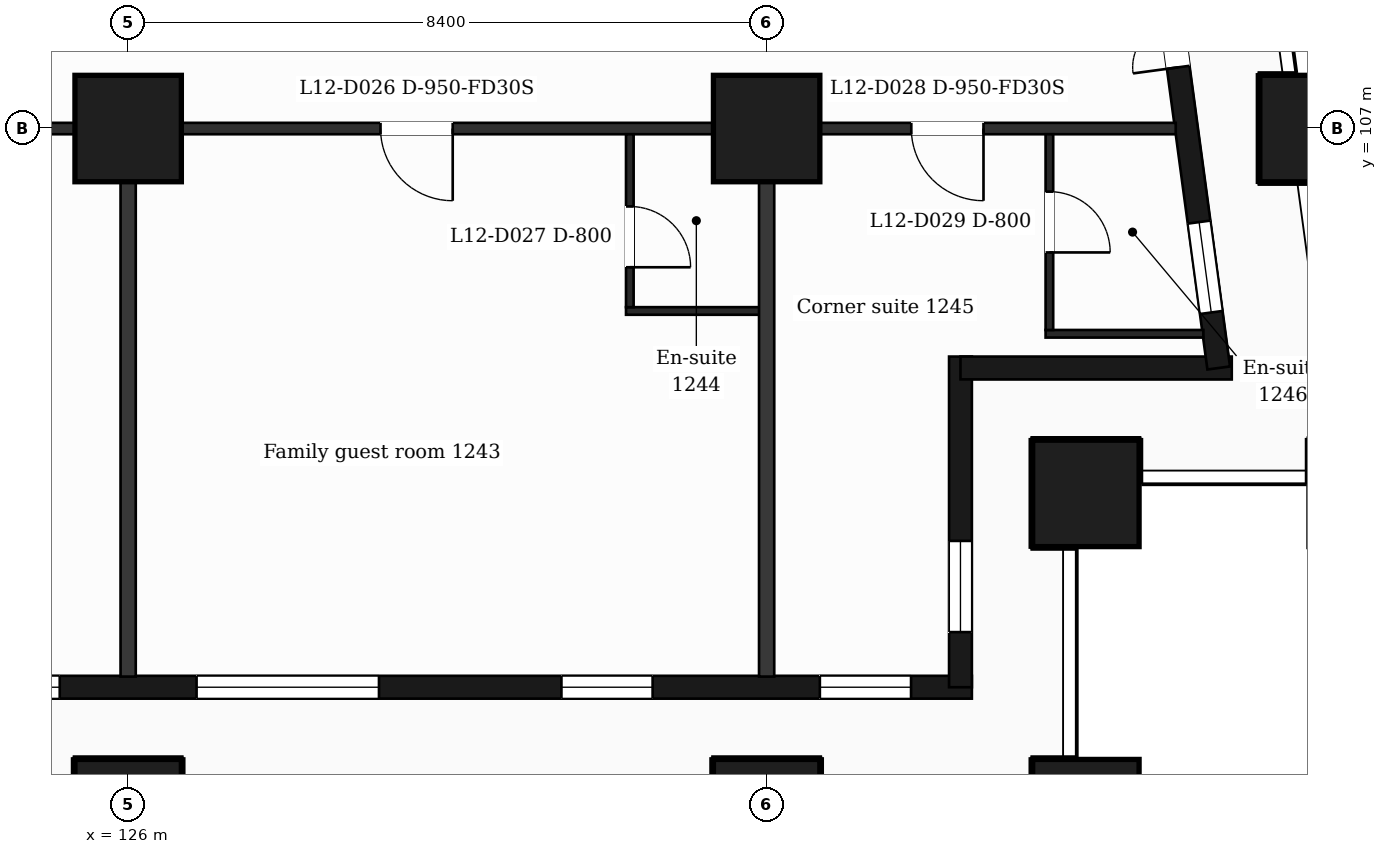
"""IFC4 building model, lengths in metres.
Left out: names, types, materials, properties, quantities, classifications, styles, units other than length and angle.
Written with IfcOpenShell. Run it as: python <this file> out.ifc"""

import sys

from ifc_helpers import new_model, si_unit, direction, frame, frame_2d, origin, origin_2d, place, context, subcontext, project, spatial, rectangle, extrude, element, fill, save


model = new_model("IFC4")
c1 = context("Model", 3, precision=1e-05, world=origin(), true_north=direction((0.0, 1.0)))
c2 = subcontext(c1, "Body", "Model", "MODEL_VIEW")
j1 = project(units=[si_unit("LENGTHUNIT", "METRE"), si_unit("PLANEANGLEUNIT", "RADIAN")], contexts=[c1])
p1 = place(None, origin())
s1 = spatial("IfcSite", under=j1, at=p1, CompositionType="ELEMENT")
p2 = place(p1, origin())
s2 = spatial("IfcBuilding", under=s1, at=p2, CompositionType="ELEMENT")
p3 = place(p2, frame((0.0, 0.0, 60.0)))
s3 = spatial("IfcBuildingStorey", under=s2, at=p3, CompositionType="ELEMENT", Elevation=60.0)
for number, where, z_axis, x_axis in (
    (1, (126.0, 98.0, 0.0), (0.0, 0.0, 1.0), (1.0, 0.0, 0.0)),
    (2, (134.4, 98.0, 0.0), (0.0, 0.0, 1.0), (1.0, 0.0, 0.0)),
    (3, (138.6, 98.0, 0.0), (0.0, 0.0, 1.0), (1.0, 0.0, 0.0)),
    (4, (138.6, 102.2, 0.0), (0.0, 0.0, 1.0), (1.0, 0.0, 0.0)),
    (5, (126.0, 107.0, 0.0), (0.0, 0.0, 1.0), (1.0, 0.0, 0.0)),
    (6, (134.4, 107.0, 0.0), (0.0, 0.0, 1.0), (1.0, 0.0, 0.0)),
    (7, (141.588, 107.0, 0.0), (0.0, 0.0, 1.0), (1.0, 0.0, 0.0)),
):
    element("IfcColumn", number, at=place(p3, frame(where, z_axis=z_axis, x_axis=x_axis)), inside=s3, PredefinedType="COLUMN", context=c2, shape_type="SweptSolid", body=[
        extrude(rectangle(XDim=1.4, YDim=1.4, at=origin_2d()), origin(), (0.0, 0.0, 1.0), 3.5),
    ])
p4 = place(p3, frame((89.85, 99.65, 0.0), z_axis=(0.0, 0.0, 1.0), x_axis=(1.0, 0.0, 0.0)))
e8 = element("IfcWall", 8, at=p4, inside=s3, PredefinedType="SOLIDWALL", context=c2, shape_type="SweptSolid", body=[
    extrude(rectangle(XDim=47.25, YDim=0.3, at=frame_2d((23.625, 0.0))), origin(), (0.0, 0.0, 1.0), 3.18),
])
p5 = place(p4, frame((0.725, 0.0, 0.9)))
e9 = element("IfcOpeningElement", 9, at=p5, cuts=e8, PredefinedType="OPENING", context=c2, shape_type="SweptSolid", body=[
    extrude(rectangle(XDim=1.2, YDim=2.1, at=frame_2d((0.6, 1.05))), frame((0.0, 0.16, 0.0), z_axis=(0.0, -1.0, 0.0), x_axis=(1.0, 0.0, 0.0)), (0.0, 0.0, 1.0), 0.32),
])
p6 = place(p4, frame((3.45, 0.0, 0.9)))
e10 = element("IfcOpeningElement", 10, at=p6, cuts=e8, PredefinedType="OPENING", context=c2, shape_type="SweptSolid", body=[
    extrude(rectangle(XDim=2.4, YDim=2.1, at=frame_2d((1.2, 1.05))), frame((0.0, 0.16, 0.0), z_axis=(0.0, -1.0, 0.0), x_axis=(1.0, 0.0, 0.0)), (0.0, 0.0, 1.0), 0.32),
])
p7 = place(p4, frame((7.65, 0.0, 0.9)))
e11 = element("IfcOpeningElement", 11, at=p7, cuts=e8, PredefinedType="OPENING", context=c2, shape_type="SweptSolid", body=[
    extrude(rectangle(XDim=2.4, YDim=2.1, at=frame_2d((1.2, 1.05))), frame((0.0, 0.16, 0.0), z_axis=(0.0, -1.0, 0.0), x_axis=(1.0, 0.0, 0.0)), (0.0, 0.0, 1.0), 0.32),
])
p8 = place(p4, frame((12.45, 0.0, 0.9)))
e12 = element("IfcOpeningElement", 12, at=p8, cuts=e8, PredefinedType="OPENING", context=c2, shape_type="SweptSolid", body=[
    extrude(rectangle(XDim=1.2, YDim=2.1, at=frame_2d((0.6, 1.05))), frame((0.0, 0.16, 0.0), z_axis=(0.0, -1.0, 0.0), x_axis=(1.0, 0.0, 0.0)), (0.0, 0.0, 1.0), 0.32),
])
p9 = place(p4, frame((16.65, 0.0, 0.9)))
e13 = element("IfcOpeningElement", 13, at=p9, cuts=e8, PredefinedType="OPENING", context=c2, shape_type="SweptSolid", body=[
    extrude(rectangle(XDim=1.2, YDim=2.1, at=frame_2d((0.6, 1.05))), frame((0.0, 0.16, 0.0), z_axis=(0.0, -1.0, 0.0), x_axis=(1.0, 0.0, 0.0)), (0.0, 0.0, 1.0), 0.32),
])
p10 = place(p4, frame((19.95, 0.0, 0.9)))
e14 = element("IfcOpeningElement", 14, at=p10, cuts=e8, PredefinedType="OPENING", context=c2, shape_type="SweptSolid", body=[
    extrude(rectangle(XDim=1.2, YDim=2.1, at=frame_2d((0.6, 1.05))), frame((0.0, 0.16, 0.0), z_axis=(0.0, -1.0, 0.0), x_axis=(1.0, 0.0, 0.0)), (0.0, 0.0, 1.0), 0.32),
])
p11 = place(p4, frame((21.75, 0.0, 0.9)))
e15 = element("IfcOpeningElement", 15, at=p11, cuts=e8, PredefinedType="OPENING", context=c2, shape_type="SweptSolid", body=[
    extrude(rectangle(XDim=1.2, YDim=2.1, at=frame_2d((0.6, 1.05))), frame((0.0, 0.16, 0.0), z_axis=(0.0, -1.0, 0.0), x_axis=(1.0, 0.0, 0.0)), (0.0, 0.0, 1.0), 0.32),
])
p12 = place(p4, frame((25.05, 0.0, 0.0)))
e16 = element("IfcOpeningElement", 16, at=p12, cuts=e8, PredefinedType="OPENING", context=c2, shape_type="SweptSolid", body=[
    extrude(rectangle(XDim=1.2, YDim=2.4, at=frame_2d((0.6, 1.2))), frame((0.0, 0.16, 0.0), z_axis=(0.0, -1.0, 0.0), x_axis=(1.0, 0.0, 0.0)), (0.0, 0.0, 1.0), 0.32),
])
p13 = place(p4, frame((28.35, 0.0, 0.9)))
e17 = element("IfcOpeningElement", 17, at=p13, cuts=e8, PredefinedType="OPENING", context=c2, shape_type="SweptSolid", body=[
    extrude(rectangle(XDim=1.2, YDim=2.1, at=frame_2d((0.6, 1.05))), frame((0.0, 0.16, 0.0), z_axis=(0.0, -1.0, 0.0), x_axis=(1.0, 0.0, 0.0)), (0.0, 0.0, 1.0), 0.32),
])
p14 = place(p4, frame((30.15, 0.0, 0.9)))
e18 = element("IfcOpeningElement", 18, at=p14, cuts=e8, PredefinedType="OPENING", context=c2, shape_type="SweptSolid", body=[
    extrude(rectangle(XDim=1.2, YDim=2.1, at=frame_2d((0.6, 1.05))), frame((0.0, 0.16, 0.0), z_axis=(0.0, -1.0, 0.0), x_axis=(1.0, 0.0, 0.0)), (0.0, 0.0, 1.0), 0.32),
])
p15 = place(p4, frame((32.85, 0.0, 0.9)))
e19 = element("IfcOpeningElement", 19, at=p15, cuts=e8, PredefinedType="OPENING", context=c2, shape_type="SweptSolid", body=[
    extrude(rectangle(XDim=2.4, YDim=2.1, at=frame_2d((1.2, 1.05))), frame((0.0, 0.16, 0.0), z_axis=(0.0, -1.0, 0.0), x_axis=(1.0, 0.0, 0.0)), (0.0, 0.0, 1.0), 0.32),
])
p16 = place(p4, frame((37.05, 0.0, 0.9)))
e20 = element("IfcOpeningElement", 20, at=p16, cuts=e8, PredefinedType="OPENING", context=c2, shape_type="SweptSolid", body=[
    extrude(rectangle(XDim=2.4, YDim=2.1, at=frame_2d((1.2, 1.05))), frame((0.0, 0.16, 0.0), z_axis=(0.0, -1.0, 0.0), x_axis=(1.0, 0.0, 0.0)), (0.0, 0.0, 1.0), 0.32),
])
p17 = place(p4, frame((41.85, 0.0, 0.9)))
e21 = element("IfcOpeningElement", 21, at=p17, cuts=e8, PredefinedType="OPENING", context=c2, shape_type="SweptSolid", body=[
    extrude(rectangle(XDim=1.2, YDim=2.1, at=frame_2d((0.6, 1.05))), frame((0.0, 0.16, 0.0), z_axis=(0.0, -1.0, 0.0), x_axis=(1.0, 0.0, 0.0)), (0.0, 0.0, 1.0), 0.32),
])
p18 = place(p4, frame((45.25, 0.0, 0.9)))
e22 = element("IfcOpeningElement", 22, at=p18, cuts=e8, PredefinedType="OPENING", context=c2, shape_type="SweptSolid", body=[
    extrude(rectangle(XDim=1.2, YDim=2.1, at=frame_2d((0.6, 1.05))), frame((0.0, 0.16, 0.0), z_axis=(0.0, -1.0, 0.0), x_axis=(1.0, 0.0, 0.0)), (0.0, 0.0, 1.0), 0.32),
])
p19 = place(p3, frame((136.95, 99.65, 0.0), z_axis=(0.0, 0.0, 1.0), x_axis=(0.0, 1.0, 0.0)))
e23 = element("IfcWall", 23, at=p19, inside=s3, PredefinedType="SOLIDWALL", context=c2, shape_type="SweptSolid", body=[
    extrude(rectangle(XDim=4.35, YDim=0.3, at=frame_2d((2.175, 0.0))), origin(), (0.0, 0.0, 1.0), 3.18),
])
p20 = place(p19, frame((0.725, 0.0, 0.9)))
e24 = element("IfcOpeningElement", 24, at=p20, cuts=e23, PredefinedType="OPENING", context=c2, shape_type="SweptSolid", body=[
    extrude(rectangle(XDim=1.2, YDim=2.1, at=frame_2d((0.6, 1.05))), frame((0.0, 0.16, 0.0), z_axis=(0.0, -1.0, 0.0), x_axis=(1.0, 0.0, 0.0)), (0.0, 0.0, 1.0), 0.32),
])
p21 = place(p3, frame((136.95, 103.85, 0.0), z_axis=(0.0, 0.0, 1.0), x_axis=(1.0, 0.0, 0.0)))
e25 = element("IfcWall", 25, at=p21, inside=s3, PredefinedType="SOLIDWALL", context=c2, shape_type="SweptSolid", body=[
    extrude(rectangle(XDim=3.569, YDim=0.3, at=frame_2d((1.785, 0.0))), origin(), (0.0, 0.0, 1.0), 3.18),
])
p22 = place(p3, frame((140.348, 103.85, 0.0), z_axis=(0.0, 0.0, 1.0), x_axis=(-0.133431549479, 0.991058031401, 0.0)))
e26 = element("IfcWall", 26, at=p22, inside=s3, PredefinedType="SOLIDWALL", context=c2, shape_type="SweptSolid", body=[
    extrude(rectangle(XDim=6.609, YDim=0.3, at=frame_2d((3.304, 0.0))), origin(), (0.0, 0.0, 1.0), 3.18),
])
p23 = place(p22, frame((0.737, 0.0, 0.9)))
e27 = element("IfcOpeningElement", 27, at=p23, cuts=e26, PredefinedType="OPENING", context=c2, shape_type="SweptSolid", body=[
    extrude(rectangle(XDim=1.2, YDim=2.1, at=frame_2d((0.6, 1.05))), frame((0.0, 0.16, 0.0), z_axis=(0.0, -1.0, 0.0), x_axis=(1.0, 0.0, 0.0)), (0.0, 0.0, 1.0), 0.32),
])
p24 = place(p22, frame((3.991, 0.0, 0.0)))
e28 = element("IfcOpeningElement", 28, at=p24, cuts=e26, PredefinedType="OPENING", context=c2, shape_type="SweptSolid", body=[
    extrude(rectangle(XDim=1.2, YDim=2.4, at=frame_2d((0.6, 1.2))), frame((0.0, 0.16, 0.0), z_axis=(0.0, -1.0, 0.0), x_axis=(1.0, 0.0, 0.0)), (0.0, 0.0, 1.0), 0.32),
])
p25 = place(p3, frame((138.07, 104.3, 0.0), z_axis=(0.0, 0.0, 1.0), x_axis=(1.0, 0.0, 0.0)))
e29 = element("IfcWall", 29, at=p25, inside=s3, PredefinedType="PARTITIONING", context=c2, shape_type="SweptSolid", body=[
    extrude(rectangle(XDim=2.076, YDim=0.1, at=frame_2d((1.038, 0.0))), origin(), (0.0, 0.0, 1.0), 3.18),
])
p26 = place(p3, frame((132.55, 104.6, 0.0), z_axis=(0.0, 0.0, 1.0), x_axis=(1.0, 0.0, 0.0)))
e30 = element("IfcWall", 30, at=p26, inside=s3, PredefinedType="PARTITIONING", context=c2, shape_type="SweptSolid", body=[
    extrude(rectangle(XDim=1.85, YDim=0.1, at=frame_2d((0.925, 0.0))), origin(), (0.0, 0.0, 1.0), 3.18),
])
p27 = place(p3, frame((87.018, 107.0, 0.0), z_axis=(0.0, 0.0, 1.0), x_axis=(1.0, 0.0, 0.0)))
e31 = element("IfcWall", 31, at=p27, inside=s3, PredefinedType="PARTITIONING", context=c2, shape_type="SweptSolid", body=[
    extrude(rectangle(XDim=52.765, YDim=0.15, at=frame_2d((26.382, 0.0))), origin(), (0.0, 0.0, 1.0), 3.18),
])
p28 = place(p27, frame((1.032, 0.0, 0.0)))
e32 = element("IfcOpeningElement", 32, at=p28, cuts=e31, PredefinedType="OPENING", context=c2, shape_type="SweptSolid", body=[
    extrude(rectangle(XDim=0.95, YDim=2.1, at=frame_2d((0.475, 1.05))), frame((0.0, 0.085, 0.0), z_axis=(0.0, -1.0, 0.0), x_axis=(1.0, 0.0, 0.0)), (0.0, 0.0, 1.0), 0.17),
])
p29 = place(p27, frame((6.894, 0.0, 0.0)))
e33 = element("IfcOpeningElement", 33, at=p29, cuts=e31, PredefinedType="OPENING", context=c2, shape_type="SweptSolid", body=[
    extrude(rectangle(XDim=0.95, YDim=2.1, at=frame_2d((0.475, 1.05))), frame((0.0, 0.085, 0.0), z_axis=(0.0, -1.0, 0.0), x_axis=(1.0, 0.0, 0.0)), (0.0, 0.0, 1.0), 0.17),
])
p30 = place(p27, frame((17.844, 0.0, 0.0)))
e34 = element("IfcOpeningElement", 34, at=p30, cuts=e31, PredefinedType="OPENING", context=c2, shape_type="SweptSolid", body=[
    extrude(rectangle(XDim=0.95, YDim=2.1, at=frame_2d((0.475, 1.05))), frame((0.0, 0.085, 0.0), z_axis=(0.0, -1.0, 0.0), x_axis=(1.0, 0.0, 0.0)), (0.0, 0.0, 1.0), 0.17),
])
p31 = place(p27, frame((26.245, 0.0, 0.0)))
e35 = element("IfcOpeningElement", 35, at=p31, cuts=e31, PredefinedType="OPENING", context=c2, shape_type="SweptSolid", body=[
    extrude(rectangle(XDim=0.95, YDim=2.1, at=frame_2d((0.475, 1.05))), frame((0.0, 0.085, 0.0), z_axis=(0.0, -1.0, 0.0), x_axis=(1.0, 0.0, 0.0)), (0.0, 0.0, 1.0), 0.17),
])
p32 = place(p27, frame((35.822, 0.0, 0.0)))
e36 = element("IfcOpeningElement", 36, at=p32, cuts=e31, PredefinedType="OPENING", context=c2, shape_type="SweptSolid", body=[
    extrude(rectangle(XDim=0.95, YDim=2.1, at=frame_2d((0.475, 1.05))), frame((0.0, 0.085, 0.0), z_axis=(0.0, -1.0, 0.0), x_axis=(1.0, 0.0, 0.0)), (0.0, 0.0, 1.0), 0.17),
])
p33 = place(p27, frame((42.302, 0.0, 0.0)))
e37 = element("IfcOpeningElement", 37, at=p33, cuts=e31, PredefinedType="OPENING", context=c2, shape_type="SweptSolid", body=[
    extrude(rectangle(XDim=0.95, YDim=2.1, at=frame_2d((0.475, 1.05))), frame((0.0, 0.085, 0.0), z_axis=(0.0, -1.0, 0.0), x_axis=(1.0, 0.0, 0.0)), (0.0, 0.0, 1.0), 0.17),
])
p34 = place(p27, frame((49.285, 0.0, 0.0)))
e38 = element("IfcOpeningElement", 38, at=p34, cuts=e31, PredefinedType="OPENING", context=c2, shape_type="SweptSolid", body=[
    extrude(rectangle(XDim=0.95, YDim=2.1, at=frame_2d((0.475, 1.05))), frame((0.0, 0.085, 0.0), z_axis=(0.0, -1.0, 0.0), x_axis=(1.0, 0.0, 0.0)), (0.0, 0.0, 1.0), 0.17),
])
p35 = place(p3, frame((126.0, 99.79, 0.0), z_axis=(0.0, 0.0, 1.0), x_axis=(0.0, 1.0, 0.0)))
e39 = element("IfcWall", 39, at=p35, inside=s3, PredefinedType="PARTITIONING", context=c2, shape_type="SweptSolid", body=[
    extrude(rectangle(XDim=7.135, YDim=0.2, at=frame_2d((3.567, 0.0))), origin(), (0.0, 0.0, 1.0), 3.18),
])
p36 = place(p3, frame((132.6, 104.65, 0.0), z_axis=(0.0, 0.0, 1.0), x_axis=(0.0, 1.0, 0.0)))
e40 = element("IfcWall", 40, at=p36, inside=s3, PredefinedType="PARTITIONING", context=c2, shape_type="SweptSolid", body=[
    extrude(rectangle(XDim=2.275, YDim=0.1, at=frame_2d((1.138, 0.0))), origin(), (0.0, 0.0, 1.0), 3.18),
])
p37 = place(p36, frame((0.525, 0.0, 0.0)))
e41 = element("IfcOpeningElement", 41, at=p37, cuts=e40, PredefinedType="OPENING", context=c2, shape_type="SweptSolid", body=[
    extrude(rectangle(XDim=0.8, YDim=2.1, at=frame_2d((0.4, 1.05))), frame((0.0, 0.06, 0.0), z_axis=(0.0, -1.0, 0.0), x_axis=(1.0, 0.0, 0.0)), (0.0, 0.0, 1.0), 0.12),
])
p38 = place(p3, frame((134.4, 99.79, 0.0), z_axis=(0.0, 0.0, 1.0), x_axis=(0.0, 1.0, 0.0)))
e42 = element("IfcWall", 42, at=p38, inside=s3, PredefinedType="PARTITIONING", context=c2, shape_type="SweptSolid", body=[
    extrude(rectangle(XDim=7.135, YDim=0.2, at=frame_2d((3.567, 0.0))), origin(), (0.0, 0.0, 1.0), 3.18),
])
p39 = place(p3, frame((138.12, 104.35, 0.0), z_axis=(0.0, 0.0, 1.0), x_axis=(0.0, 1.0, 0.0)))
e43 = element("IfcWall", 43, at=p39, inside=s3, PredefinedType="PARTITIONING", context=c2, shape_type="SweptSolid", body=[
    extrude(rectangle(XDim=2.575, YDim=0.1, at=frame_2d((1.288, 0.0))), origin(), (0.0, 0.0, 1.0), 3.18),
])
p40 = place(p39, frame((1.02, 0.0, 0.0)))
e44 = element("IfcOpeningElement", 44, at=p40, cuts=e43, PredefinedType="OPENING", context=c2, shape_type="SweptSolid", body=[
    extrude(rectangle(XDim=0.8, YDim=2.1, at=frame_2d((0.4, 1.05))), frame((0.0, 0.06, 0.0), z_axis=(0.0, -1.0, 0.0), x_axis=(1.0, 0.0, 0.0)), (0.0, 0.0, 1.0), 0.12),
])
p41 = place(p15, origin())
e45 = element("IfcWindow", 45, at=p41, inside=s3, PartitioningType="SINGLE_PANEL", PredefinedType="WINDOW", context=c2, shape_type="SweptSolid", body=[
    extrude(rectangle(XDim=2.4, YDim=2.1, at=frame_2d((1.2, 1.05))), frame((0.0, 0.03, 0.0), z_axis=(0.0, -1.0, 0.0), x_axis=(1.0, 0.0, 0.0)), (0.0, 0.0, 1.0), 0.06),
])
fill(e19, e45)
p42 = place(p16, origin())
e46 = element("IfcWindow", 46, at=p42, inside=s3, PartitioningType="SINGLE_PANEL", PredefinedType="WINDOW", context=c2, shape_type="SweptSolid", body=[
    extrude(rectangle(XDim=2.4, YDim=2.1, at=frame_2d((1.2, 1.05))), frame((0.0, 0.03, 0.0), z_axis=(0.0, -1.0, 0.0), x_axis=(1.0, 0.0, 0.0)), (0.0, 0.0, 1.0), 0.06),
])
fill(e20, e46)
p43 = place(p17, origin())
e47 = element("IfcWindow", 47, at=p43, inside=s3, PartitioningType="SINGLE_PANEL", PredefinedType="WINDOW", context=c2, shape_type="SweptSolid", body=[
    extrude(rectangle(XDim=1.2, YDim=2.1, at=frame_2d((0.6, 1.05))), frame((0.0, 0.03, 0.0), z_axis=(0.0, -1.0, 0.0), x_axis=(1.0, 0.0, 0.0)), (0.0, 0.0, 1.0), 0.06),
])
fill(e21, e47)
p44 = place(p18, origin())
e48 = element("IfcWindow", 48, at=p44, inside=s3, PartitioningType="SINGLE_PANEL", PredefinedType="WINDOW", context=c2, shape_type="SweptSolid", body=[
    extrude(rectangle(XDim=1.2, YDim=2.1, at=frame_2d((0.6, 1.05))), frame((0.0, 0.03, 0.0), z_axis=(0.0, -1.0, 0.0), x_axis=(1.0, 0.0, 0.0)), (0.0, 0.0, 1.0), 0.06),
])
fill(e22, e48)
p45 = place(p20, origin())
e49 = element("IfcWindow", 49, at=p45, inside=s3, PartitioningType="SINGLE_PANEL", PredefinedType="WINDOW", context=c2, shape_type="SweptSolid", body=[
    extrude(rectangle(XDim=1.2, YDim=2.1, at=frame_2d((0.6, 1.05))), frame((0.0, 0.03, 0.0), z_axis=(0.0, -1.0, 0.0), x_axis=(1.0, 0.0, 0.0)), (0.0, 0.0, 1.0), 0.06),
])
fill(e24, e49)
p46 = place(p23, origin())
e50 = element("IfcWindow", 50, at=p46, inside=s3, PartitioningType="SINGLE_PANEL", PredefinedType="WINDOW", context=c2, shape_type="SweptSolid", body=[
    extrude(rectangle(XDim=1.2, YDim=2.1, at=frame_2d((0.6, 1.05))), frame((0.0, 0.03, 0.0), z_axis=(0.0, -1.0, 0.0), x_axis=(1.0, 0.0, 0.0)), (0.0, 0.0, 1.0), 0.06),
])
fill(e27, e50)
p47 = place(p24, origin())
e51 = element("IfcDoor", 51, at=p47, inside=s3, OperationType="DOUBLE_DOOR_SINGLE_SWING", PredefinedType="DOOR", context=c2, shape_type="SweptSolid", body=[
    extrude(rectangle(XDim=1.2, YDim=2.4, at=frame_2d((0.6, 1.2))), frame((0.0, 0.025, 0.0), z_axis=(0.0, -1.0, 0.0), x_axis=(1.0, 0.0, 0.0)), (0.0, 0.0, 1.0), 0.05),
])
fill(e28, e51)
p48 = place(p33, origin())
e52 = element("IfcDoor", 52, at=p48, inside=s3, OperationType="SINGLE_SWING_RIGHT", PredefinedType="DOOR", context=c2, shape_type="SweptSolid", body=[
    extrude(rectangle(XDim=0.95, YDim=2.1, at=frame_2d((0.475, 1.05))), frame((0.0, 0.025, 0.0), z_axis=(0.0, -1.0, 0.0), x_axis=(1.0, 0.0, 0.0)), (0.0, 0.0, 1.0), 0.05),
])
fill(e37, e52)
p49 = place(p37, origin())
e53 = element("IfcDoor", 53, at=p49, inside=s3, OperationType="SINGLE_SWING_LEFT", PredefinedType="DOOR", context=c2, shape_type="SweptSolid", body=[
    extrude(rectangle(XDim=0.8, YDim=2.1, at=frame_2d((0.4, 1.05))), frame((0.0, 0.025, 0.0), z_axis=(0.0, -1.0, 0.0), x_axis=(1.0, 0.0, 0.0)), (0.0, 0.0, 1.0), 0.05),
])
fill(e41, e53)
p50 = place(p34, origin())
e54 = element("IfcDoor", 54, at=p50, inside=s3, OperationType="SINGLE_SWING_RIGHT", PredefinedType="DOOR", context=c2, shape_type="SweptSolid", body=[
    extrude(rectangle(XDim=0.95, YDim=2.1, at=frame_2d((0.475, 1.05))), frame((0.0, 0.025, 0.0), z_axis=(0.0, -1.0, 0.0), x_axis=(1.0, 0.0, 0.0)), (0.0, 0.0, 1.0), 0.05),
])
fill(e38, e54)
p51 = place(p40, origin())
e55 = element("IfcDoor", 55, at=p51, inside=s3, OperationType="SINGLE_SWING_LEFT", PredefinedType="DOOR", context=c2, shape_type="SweptSolid", body=[
    extrude(rectangle(XDim=0.8, YDim=2.1, at=frame_2d((0.4, 1.05))), frame((0.0, 0.025, 0.0), z_axis=(0.0, -1.0, 0.0), x_axis=(1.0, 0.0, 0.0)), (0.0, 0.0, 1.0), 0.05),
])
fill(e44, e55)
save(model, sys.argv[1])
